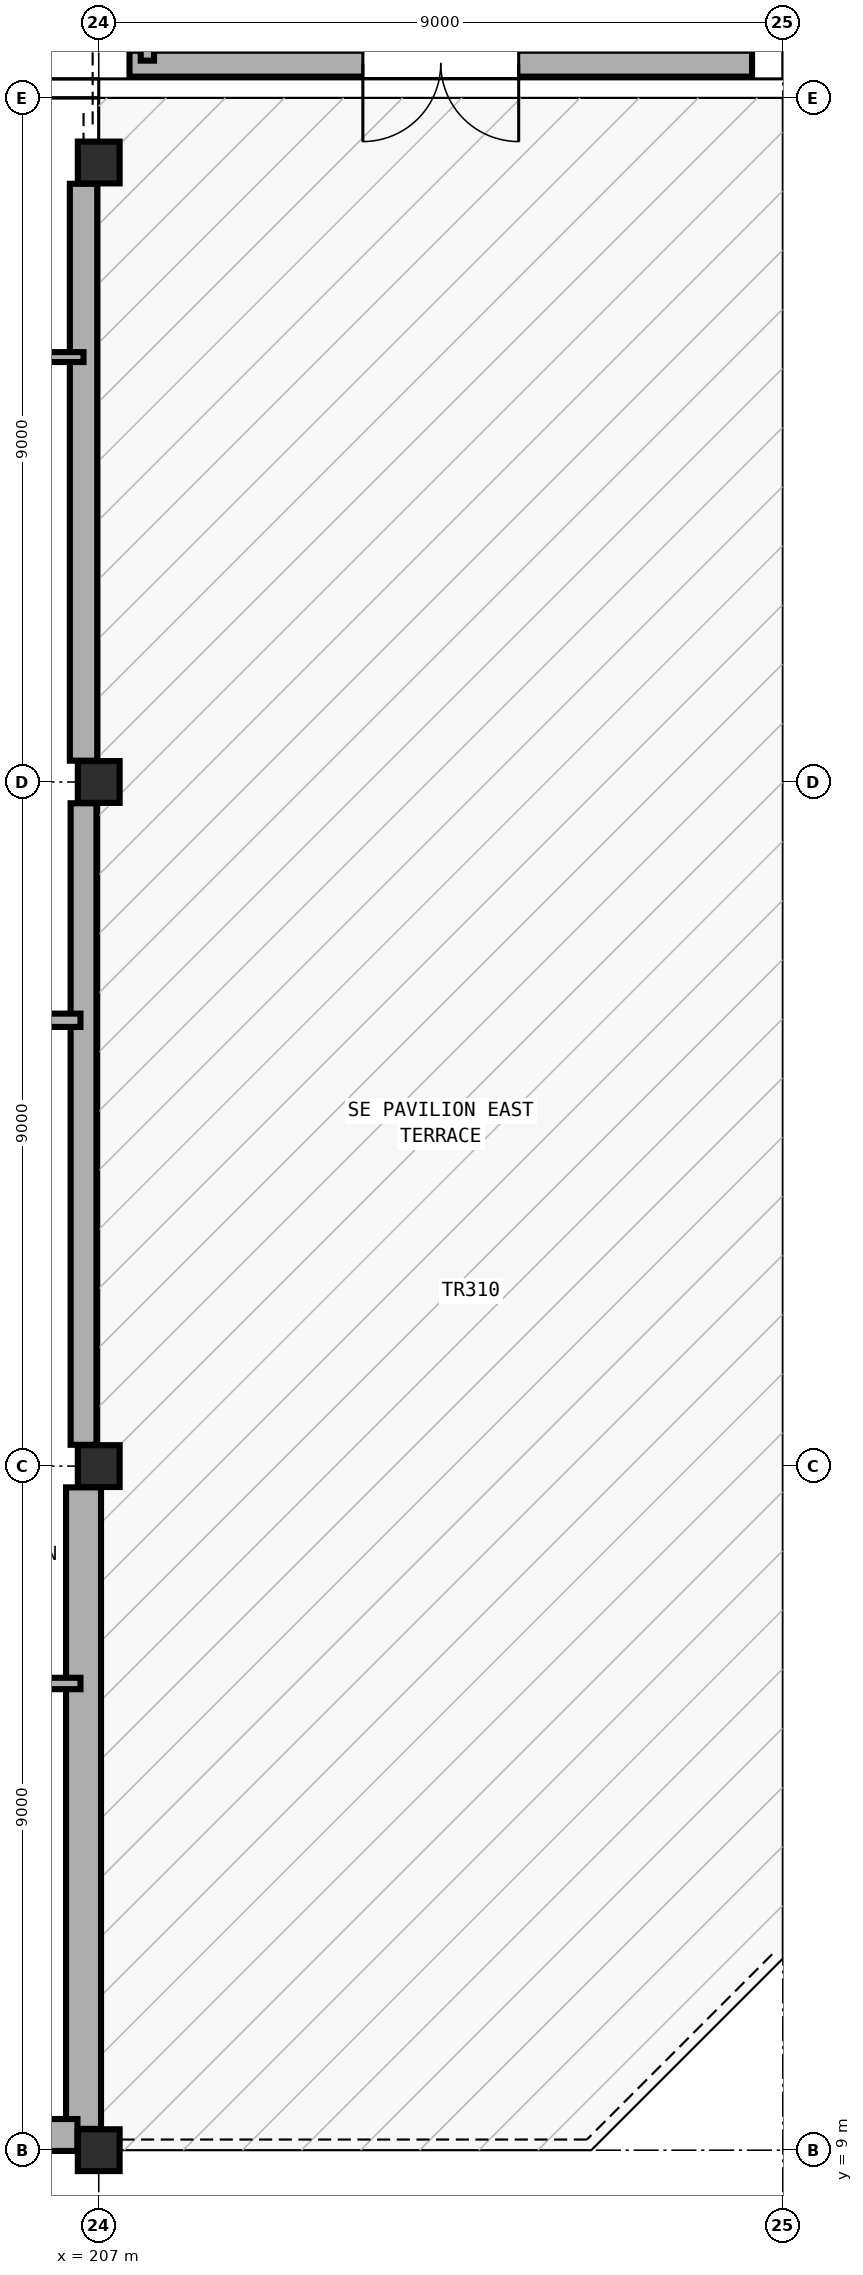
"""IFC4 building model, lengths in metres.
Left out: names, types, materials, properties, quantities, classifications, styles, units other than length and angle.
Written with IfcOpenShell. Run it as: python <this file> out.ifc"""

import sys

from ifc_helpers import new_model, si_unit, direction, frame, frame_2d, origin, origin_2d, place, context, subcontext, project, spatial, rectangle, extrude, element, fill, save


model = new_model("IFC4")
c1 = context("Model", 3, precision=1e-05, world=origin(), true_north=direction((0.0, 1.0)))
c2 = subcontext(c1, "Body", "Model", "MODEL_VIEW")
j1 = project(units=[si_unit("LENGTHUNIT", "METRE"), si_unit("PLANEANGLEUNIT", "RADIAN")], contexts=[c1])
p1 = place(None, origin())
s1 = spatial("IfcSite", under=j1, at=p1, CompositionType="ELEMENT")
p2 = place(p1, origin())
s2 = spatial("IfcBuilding", under=s1, at=p2, CompositionType="ELEMENT")
p3 = place(p2, frame((0.0, 0.0, 9.6)))
s3 = spatial("IfcBuildingStorey", under=s2, at=p3, CompositionType="ELEMENT", Elevation=9.6)
for number, where, z_axis, x_axis in (
    (1, (207.0, 9.0, 0.0), (0.0, 0.0, 1.0), (1.0, 0.0, 0.0)),
    (2, (207.0, 18.0, 0.0), (0.0, 0.0, 1.0), (1.0, 0.0, 0.0)),
    (3, (207.0, 27.0, 0.0), (0.0, 0.0, 1.0), (1.0, 0.0, 0.0)),
    (4, (207.0, 35.15, 0.0), (0.0, 0.0, 1.0), (1.0, 0.0, 0.0)),
):
    element("IfcColumn", number, at=place(p3, frame(where, z_axis=z_axis, x_axis=x_axis)), inside=s3, PredefinedType="COLUMN", context=c2, shape_type="SweptSolid", body=[
        extrude(rectangle(XDim=0.55, YDim=0.55, at=origin_2d()), origin(), (0.0, 0.0, 1.0), 4.8),
    ])
p4 = place(p3, frame((215.595, 36.45, 0.0), z_axis=(0.0, 0.0, 1.0), x_axis=(-1.0, 0.0, 0.0)))
e5 = element("IfcWall", 5, at=p4, inside=s3, PredefinedType="SOLIDWALL", context=c2, shape_type="SweptSolid", body=[
    extrude(rectangle(XDim=8.19, YDim=0.34, at=frame_2d((4.095, 0.0))), origin(), (0.0, 0.0, 1.0), 3.58),
])
p5 = place(p4, frame((3.07, 0.0, 0.0)))
e6 = element("IfcOpeningElement", 6, at=p5, cuts=e5, PredefinedType="OPENING", context=c2, shape_type="SweptSolid", body=[
    extrude(rectangle(XDim=2.05, YDim=2.3, at=frame_2d((1.025, 1.15))), frame((0.0, 0.18, 0.0), z_axis=(0.0, -1.0, 0.0), x_axis=(1.0, 0.0, 0.0)), (0.0, 0.0, 1.0), 0.36),
])
p6 = place(p3, frame((206.8, 34.87, 0.0), z_axis=(0.0, 0.0, 1.0), x_axis=(0.0, -1.0, 0.0)))
e7 = element("IfcWall", 7, at=p6, inside=s3, PredefinedType="SOLIDWALL", context=c2, shape_type="SweptSolid", body=[
    extrude(rectangle(XDim=7.59, YDim=0.36, at=frame_2d((3.795, 0.0))), origin(), (0.0, 0.0, 1.0), 3.58),
])
p7 = place(p3, frame((206.8, 26.72, 0.0), z_axis=(0.0, 0.0, 1.0), x_axis=(0.0, -1.0, 0.0)))
e8 = element("IfcWall", 8, at=p7, inside=s3, PredefinedType="SOLIDWALL", context=c2, shape_type="SweptSolid", body=[
    extrude(rectangle(XDim=8.44, YDim=0.34, at=frame_2d((4.22, 0.0))), origin(), (0.0, 0.0, 1.0), 3.58),
])
p8 = place(p3, frame((206.8, 17.72, 0.0), z_axis=(0.0, 0.0, 1.0), x_axis=(0.0, -1.0, 0.0)))
e9 = element("IfcWall", 9, at=p8, inside=s3, PredefinedType="SOLIDWALL", context=c2, shape_type="SweptSolid", body=[
    extrude(rectangle(XDim=8.44, YDim=0.46, at=frame_2d((4.22, 0.0))), origin(), (0.0, 0.0, 1.0), 3.58),
])
p9 = place(p3, frame((206.72, 9.2, 0.0), z_axis=(0.0, 0.0, 1.0), x_axis=(-1.0, 0.0, 0.0)))
e10 = element("IfcWall", 10, at=p9, inside=s3, PredefinedType="SOLIDWALL", context=c2, shape_type="SweptSolid", body=[
    extrude(rectangle(XDim=8.44, YDim=0.42, at=frame_2d((4.22, 0.0))), origin(), (0.0, 0.0, 1.0), 3.58),
])
p10 = place(p9, frame((2.62, 0.0, 0.9)))
e11 = element("IfcOpeningElement", 11, at=p10, cuts=e10, PredefinedType="OPENING", context=c2, shape_type="SweptSolid", body=[
    extrude(rectangle(XDim=3.2, YDim=2.05, at=frame_2d((1.6, 1.025))), frame((0.0, 0.22, 0.0), z_axis=(0.0, -1.0, 0.0), x_axis=(1.0, 0.0, 0.0)), (0.0, 0.0, 1.0), 0.44),
])
p11 = place(p3, frame((207.64, 36.49, 0.0), z_axis=(0.0, 0.0, 1.0), x_axis=(0.0, 1.0, 0.0)))
e12 = element("IfcWall", 12, at=p11, inside=s3, PredefinedType="PARTITIONING", context=c2, shape_type="SweptSolid", body=[
    extrude(rectangle(XDim=3.01, YDim=0.175, at=frame_2d((1.505, 0.0))), origin(), (0.0, 0.0, 1.0), 3.56),
])
p12 = place(p3, frame((203.56, 23.865, 0.0), z_axis=(0.0, 0.0, 1.0), x_axis=(1.0, 0.0, 0.0)))
e13 = element("IfcWall", 13, at=p12, inside=s3, PredefinedType="PARTITIONING", context=c2, shape_type="SweptSolid", body=[
    extrude(rectangle(XDim=3.2, YDim=0.175, at=frame_2d((1.6, 0.0))), origin(), (0.0, 0.0, 1.0), 3.56),
])
p13 = place(p3, frame((206.76, 15.14, 0.0), z_axis=(0.0, 0.0, 1.0), x_axis=(-1.0, 0.0, 0.0)))
e14 = element("IfcWall", 14, at=p13, inside=s3, PredefinedType="PARTITIONING", context=c2, shape_type="SweptSolid", body=[
    extrude(rectangle(XDim=3.2, YDim=0.15, at=frame_2d((1.6, 0.0))), origin(), (0.0, 0.0, 1.0), 3.56),
])
p14 = place(p3, frame((206.8, 32.59, 0.0), z_axis=(0.0, 0.0, 1.0), x_axis=(-1.0, 0.0, 0.0)))
e15 = element("IfcWall", 15, at=p14, inside=s3, PredefinedType="PARTITIONING", context=c2, shape_type="SweptSolid", body=[
    extrude(rectangle(XDim=3.28, YDim=0.13, at=frame_2d((1.64, 0.0))), origin(), (0.0, 0.0, 1.0), 3.56),
])
p15 = place(p14, frame((1.13, 0.0, 0.0)))
e16 = element("IfcOpeningElement", 16, at=p15, cuts=e15, PredefinedType="OPENING", context=c2, shape_type="SweptSolid", body=[
    extrude(rectangle(XDim=1.02, YDim=2.16, at=frame_2d((0.51, 1.08))), frame((0.0, 0.075, 0.0), z_axis=(0.0, -1.0, 0.0), x_axis=(1.0, 0.0, 0.0)), (0.0, 0.0, 1.0), 0.15),
])
p16 = place(p5, origin())
e17 = element("IfcDoor", 17, at=p16, inside=s3, OperationType="DOUBLE_DOOR_SINGLE_SWING", PredefinedType="DOOR", context=c2, shape_type="SweptSolid", body=[
    extrude(rectangle(XDim=2.05, YDim=2.3, at=frame_2d((1.025, 1.15))), frame((0.0, 0.025, 0.0), z_axis=(0.0, -1.0, 0.0), x_axis=(1.0, 0.0, 0.0)), (0.0, 0.0, 1.0), 0.05),
])
fill(e6, e17)
save(model, sys.argv[1])
